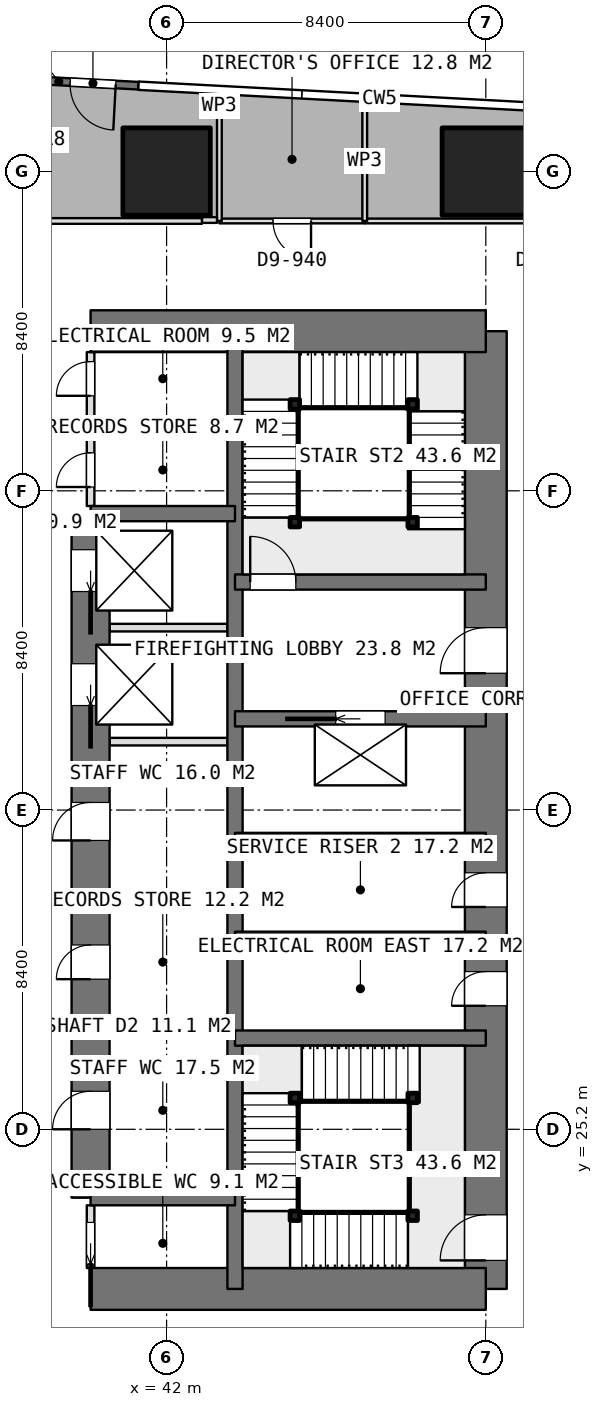
"""IFC4 building model, lengths in metres.
Left out: names, types, materials, properties, quantities, classifications, styles, units other than length and angle.
Written with IfcOpenShell. Run it as: python <this file> out.ifc"""

import sys

from ifc_helpers import new_model, si_unit, direction, frame, frame_2d, origin, origin_2d, place, context, subcontext, project, spatial, rectangle, extrude, element, fill, save


model = new_model("IFC4")
c1 = context("Model", 3, precision=1e-05, world=origin(), true_north=direction((0.0, 1.0)))
c2 = subcontext(c1, "Body", "Model", "MODEL_VIEW")
j1 = project(units=[si_unit("LENGTHUNIT", "METRE"), si_unit("PLANEANGLEUNIT", "RADIAN")], contexts=[c1])
p1 = place(None, origin())
s1 = spatial("IfcSite", under=j1, at=p1, CompositionType="ELEMENT")
p2 = place(p1, origin())
s2 = spatial("IfcBuilding", under=s1, at=p2, CompositionType="ELEMENT")
p3 = place(p2, frame((0.0, 0.0, 245.6)))
s3 = spatial("IfcBuildingStorey", under=s2, at=p3, CompositionType="ELEMENT", Elevation=245.6)
for number, where, z_axis, x_axis in (
    (1, (40.0, 21.0, 0.0), (0.0, 0.0, 1.0), (1.0, 0.0, 0.0)),
    (2, (40.0, 46.2, 0.0), (0.0, 0.0, 1.0), (1.0, 0.0, 0.0)),
):
    element("IfcWall", number, at=place(p3, frame(where, z_axis=z_axis, x_axis=x_axis)), inside=s3, PredefinedType="SHEAR", context=c2, shape_type="SweptSolid", body=[
        extrude(rectangle(XDim=10.4, YDim=1.1, at=frame_2d((5.2, 0.0))), origin(), (0.0, 0.0, 1.0), 4.5),
    ])
p4 = place(p3, frame((50.4, 21.0, 0.0), z_axis=(0.0, 0.0, 1.0), x_axis=(0.0, 1.0, 0.0)))
e3 = element("IfcWall", 3, at=p4, inside=s3, PredefinedType="SHEAR", context=c2, shape_type="SweptSolid", body=[
    extrude(rectangle(XDim=25.2, YDim=1.1, at=frame_2d((12.6, 0.0))), origin(), (0.0, 0.0, 1.0), 4.5),
])
p5 = place(p4, frame((16.2, 0.0, 0.0)))
e4 = element("IfcOpeningElement", 4, at=p5, cuts=e3, PredefinedType="OPENING", context=c2, shape_type="SweptSolid", body=[
    extrude(rectangle(XDim=1.2, YDim=2.1, at=frame_2d((0.6, 1.05))), frame((0.0, 0.56, 0.0), z_axis=(0.0, -1.0, 0.0), x_axis=(1.0, 0.0, 0.0)), (0.0, 0.0, 1.0), 1.12),
])
p6 = place(p4, frame((10.05, 0.0, 0.0)))
e5 = element("IfcOpeningElement", 5, at=p6, cuts=e3, PredefinedType="OPENING", context=c2, shape_type="SweptSolid", body=[
    extrude(rectangle(XDim=0.9, YDim=2.1, at=frame_2d((0.45, 1.05))), frame((0.0, 0.56, 0.0), z_axis=(0.0, -1.0, 0.0), x_axis=(1.0, 0.0, 0.0)), (0.0, 0.0, 1.0), 1.12),
])
p7 = place(p4, frame((7.45, 0.0, 0.0)))
e6 = element("IfcOpeningElement", 6, at=p7, cuts=e3, PredefinedType="OPENING", context=c2, shape_type="SweptSolid", body=[
    extrude(rectangle(XDim=0.9, YDim=2.1, at=frame_2d((0.45, 1.05))), frame((0.0, 0.56, 0.0), z_axis=(0.0, -1.0, 0.0), x_axis=(1.0, 0.0, 0.0)), (0.0, 0.0, 1.0), 1.12),
])
p8 = place(p4, frame((0.75, 0.0, 0.0)))
e7 = element("IfcOpeningElement", 7, at=p8, cuts=e3, PredefinedType="OPENING", context=c2, shape_type="SweptSolid", body=[
    extrude(rectangle(XDim=1.2, YDim=2.1, at=frame_2d((0.6, 1.05))), frame((0.0, 0.56, 0.0), z_axis=(0.0, -1.0, 0.0), x_axis=(1.0, 0.0, 0.0)), (0.0, 0.0, 1.0), 1.12),
])
p9 = place(p3, frame((43.8, 21.0, 0.0), z_axis=(0.0, 0.0, 1.0), x_axis=(0.0, 1.0, 0.0)))
e8 = element("IfcWall", 8, at=p9, inside=s3, PredefinedType="SHEAR", context=c2, shape_type="SweptSolid", body=[
    extrude(rectangle(XDim=25.2, YDim=0.4, at=frame_2d((12.6, 0.0))), origin(), (0.0, 0.0, 1.0), 4.5),
])
p10 = place(p3, frame((40.0, 23.4, 0.0), z_axis=(0.0, 0.0, 1.0), x_axis=(0.0, 1.0, 0.0)))
e9 = element("IfcWall", 9, at=p10, inside=s3, PredefinedType="SHEAR", context=c2, shape_type="SweptSolid", body=[
    extrude(rectangle(XDim=18.0, YDim=1.0, at=frame_2d((9.0, 0.0))), origin(), (0.0, 0.0, 1.0), 4.5),
])
p11 = place(p10, frame((1.8, 0.0, 0.0)))
e10 = element("IfcOpeningElement", 10, at=p11, cuts=e9, PredefinedType="OPENING", context=c2, shape_type="SweptSolid", body=[
    extrude(rectangle(XDim=1.0, YDim=2.1, at=frame_2d((0.5, 1.05))), frame((0.0, 0.51, 0.0), z_axis=(0.0, -1.0, 0.0), x_axis=(1.0, 0.0, 0.0)), (0.0, 0.0, 1.0), 1.02),
])
p12 = place(p10, frame((5.75, 0.0, 0.0)))
e11 = element("IfcOpeningElement", 11, at=p12, cuts=e9, PredefinedType="OPENING", context=c2, shape_type="SweptSolid", body=[
    extrude(rectangle(XDim=0.9, YDim=2.1, at=frame_2d((0.45, 1.05))), frame((0.0, 0.51, 0.0), z_axis=(0.0, -1.0, 0.0), x_axis=(1.0, 0.0, 0.0)), (0.0, 0.0, 1.0), 1.02),
])
p13 = place(p10, frame((9.4, 0.0, 0.0)))
e12 = element("IfcOpeningElement", 12, at=p13, cuts=e9, PredefinedType="OPENING", context=c2, shape_type="SweptSolid", body=[
    extrude(rectangle(XDim=1.0, YDim=2.1, at=frame_2d((0.5, 1.05))), frame((0.0, 0.51, 0.0), z_axis=(0.0, -1.0, 0.0), x_axis=(1.0, 0.0, 0.0)), (0.0, 0.0, 1.0), 1.02),
])
p14 = place(p10, frame((12.95, 0.0, 0.0)))
e13 = element("IfcOpeningElement", 13, at=p14, cuts=e9, PredefinedType="OPENING", context=c2, shape_type="SweptSolid", body=[
    extrude(rectangle(XDim=1.1, YDim=2.1, at=frame_2d((0.55, 1.05))), frame((0.0, 0.51, 0.0), z_axis=(0.0, -1.0, 0.0), x_axis=(1.0, 0.0, 0.0)), (0.0, 0.0, 1.0), 1.02),
])
p15 = place(p10, frame((15.95, 0.0, 0.0)))
e14 = element("IfcOpeningElement", 14, at=p15, cuts=e9, PredefinedType="OPENING", context=c2, shape_type="SweptSolid", body=[
    extrude(rectangle(XDim=1.1, YDim=2.1, at=frame_2d((0.55, 1.05))), frame((0.0, 0.51, 0.0), z_axis=(0.0, -1.0, 0.0), x_axis=(1.0, 0.0, 0.0)), (0.0, 0.0, 1.0), 1.02),
])
for number, where, z_axis, x_axis in (
    (15, (40.0, 23.4, 0.0), (0.0, 0.0, 1.0), (1.0, 0.0, 0.0)),
    (16, (40.0, 41.4, 0.0), (0.0, 0.0, 1.0), (1.0, 0.0, 0.0)),
):
    element("IfcWall", number, at=place(p3, frame(where, z_axis=z_axis, x_axis=x_axis)), inside=s3, PredefinedType="SHEAR", context=c2, shape_type="SweptSolid", body=[
        extrude(rectangle(XDim=3.8, YDim=0.4, at=frame_2d((1.9, 0.0))), origin(), (0.0, 0.0, 1.0), 4.5),
    ])
for number, where, z_axis, x_axis in (
    (17, (43.8, 27.6, 0.0), (0.0, 0.0, 1.0), (1.0, 0.0, 0.0)),
    (18, (43.8, 30.2, 0.0), (0.0, 0.0, 1.0), (1.0, 0.0, 0.0)),
    (19, (43.8, 32.8, 0.0), (0.0, 0.0, 1.0), (1.0, 0.0, 0.0)),
):
    element("IfcWall", number, at=place(p3, frame(where, z_axis=z_axis, x_axis=x_axis)), inside=s3, PredefinedType="SHEAR", context=c2, shape_type="SweptSolid", body=[
        extrude(rectangle(XDim=6.6, YDim=0.4, at=frame_2d((3.3, 0.0))), origin(), (0.0, 0.0, 1.0), 4.5),
    ])
p16 = place(p3, frame((43.8, 36.0, 0.0), z_axis=(0.0, 0.0, 1.0), x_axis=(1.0, 0.0, 0.0)))
e20 = element("IfcWall", 20, at=p16, inside=s3, PredefinedType="SHEAR", context=c2, shape_type="SweptSolid", body=[
    extrude(rectangle(XDim=6.6, YDim=0.4, at=frame_2d((3.3, 0.0))), origin(), (0.0, 0.0, 1.0), 4.5),
])
p17 = place(p16, frame((2.65, 0.0, 0.0)))
e21 = element("IfcOpeningElement", 21, at=p17, cuts=e20, PredefinedType="OPENING", context=c2, shape_type="SweptSolid", body=[
    extrude(rectangle(XDim=1.3, YDim=2.1, at=frame_2d((0.65, 1.05))), frame((0.0, 0.21, 0.0), z_axis=(0.0, -1.0, 0.0), x_axis=(1.0, 0.0, 0.0)), (0.0, 0.0, 1.0), 0.42),
])
p18 = place(p3, frame((43.8, 39.6, 0.0), z_axis=(0.0, 0.0, 1.0), x_axis=(1.0, 0.0, 0.0)))
e22 = element("IfcWall", 22, at=p18, inside=s3, PredefinedType="SHEAR", context=c2, shape_type="SweptSolid", body=[
    extrude(rectangle(XDim=6.6, YDim=0.4, at=frame_2d((3.3, 0.0))), origin(), (0.0, 0.0, 1.0), 4.5),
])
p19 = place(p18, frame((0.4, 0.0, 0.0)))
e23 = element("IfcOpeningElement", 23, at=p19, cuts=e22, PredefinedType="OPENING", context=c2, shape_type="SweptSolid", body=[
    extrude(rectangle(XDim=1.2, YDim=2.1, at=frame_2d((0.6, 1.05))), frame((0.0, 0.21, 0.0), z_axis=(0.0, -1.0, 0.0), x_axis=(1.0, 0.0, 0.0)), (0.0, 0.0, 1.0), 0.42),
])
for number, where, z_axis, x_axis in (
    (24, (42.0, 50.4, 0.0), (0.0, 0.0, 1.0), (1.0, 0.0, 0.0)),
    (25, (50.4, 50.4, 0.0), (0.0, 0.0, 1.0), (1.0, 0.0, 0.0)),
):
    element("IfcColumn", number, at=place(p3, frame(where, z_axis=z_axis, x_axis=x_axis)), inside=s3, PredefinedType="COLUMN", context=c2, shape_type="SweptSolid", body=[
        extrude(rectangle(XDim=2.3, YDim=2.3, at=origin_2d()), origin(), (0.0, 0.0, 1.0), 4.5),
    ])
p20 = place(p3, frame((41.26, 52.659, 0.0), z_axis=(0.0, 0.0, 1.0), x_axis=(-0.998590720997, 0.053071385312, 0.0)))
e26 = element("IfcWall", 26, at=p20, inside=s3, PredefinedType="SOLIDWALL", context=c2, shape_type="SweptSolid", body=[
    extrude(rectangle(XDim=4.2, YDim=0.2, at=frame_2d((2.1, 0.0))), origin(), (0.0, 0.0, 1.0), 4.25),
])
p21 = place(p20, frame((0.6, 0.0, 0.0)))
e27 = element("IfcOpeningElement", 27, at=p21, cuts=e26, PredefinedType="OPENING", context=c2, shape_type="SweptSolid", body=[
    extrude(rectangle(XDim=1.2, YDim=2.4, at=frame_2d((0.6, 1.2))), frame((0.0, 0.11, 0.0), z_axis=(0.0, -1.0, 0.0), x_axis=(1.0, 0.0, 0.0)), (0.0, 0.0, 1.0), 0.22),
])
p22 = place(p20, frame((2.4, 0.0, 0.0)))
e28 = element("IfcOpeningElement", 28, at=p22, cuts=e26, PredefinedType="OPENING", context=c2, shape_type="SweptSolid", body=[
    extrude(rectangle(XDim=1.2, YDim=2.4, at=frame_2d((0.6, 1.2))), frame((0.0, 0.11, 0.0), z_axis=(0.0, -1.0, 0.0), x_axis=(1.0, 0.0, 0.0)), (0.0, 0.0, 1.0), 0.22),
])
for number, where, z_axis, x_axis in (
    (29, (40.5, 35.4, 0.0), (0.0, 0.0, 1.0), (1.0, 0.0, 0.0)),
    (30, (40.5, 38.4, 0.0), (0.0, 0.0, 1.0), (1.0, 0.0, 0.0)),
):
    element("IfcWall", number, at=place(p3, frame(where, z_axis=z_axis, x_axis=x_axis)), inside=s3, PredefinedType="PARTITIONING", context=c2, shape_type="SweptSolid", body=[
        extrude(rectangle(XDim=3.1, YDim=0.2, at=frame_2d((1.55, 0.0))), origin(), (0.0, 0.0, 1.0), 4.25),
    ])
p23 = place(p3, frame((40.0, 21.55, 0.0), z_axis=(0.0, 0.0, 1.0), x_axis=(0.0, 1.0, 0.0)))
e31 = element("IfcWall", 31, at=p23, inside=s3, PredefinedType="PARTITIONING", context=c2, shape_type="SweptSolid", body=[
    extrude(rectangle(XDim=1.65, YDim=0.2, at=frame_2d((0.825, 0.0))), origin(), (0.0, 0.0, 1.0), 4.25),
])
p24 = place(p23, frame((0.1, 0.0, 0.0)))
e32 = element("IfcOpeningElement", 32, at=p24, cuts=e31, PredefinedType="OPENING", context=c2, shape_type="SweptSolid", body=[
    extrude(rectangle(XDim=1.1, YDim=2.1, at=frame_2d((0.55, 1.05))), frame((0.0, 0.11, 0.0), z_axis=(0.0, -1.0, 0.0), x_axis=(1.0, 0.0, 0.0)), (0.0, 0.0, 1.0), 0.22),
])
p25 = place(p3, frame((40.0, 41.6, 0.0), z_axis=(0.0, 0.0, 1.0), x_axis=(0.0, 1.0, 0.0)))
e33 = element("IfcWall", 33, at=p25, inside=s3, PredefinedType="PARTITIONING", context=c2, shape_type="SweptSolid", body=[
    extrude(rectangle(XDim=4.05, YDim=0.2, at=frame_2d((2.025, 0.0))), origin(), (0.0, 0.0, 1.0), 4.25),
])
p26 = place(p25, frame((2.9, 0.0, 0.0)))
e34 = element("IfcOpeningElement", 34, at=p26, cuts=e33, PredefinedType="OPENING", context=c2, shape_type="SweptSolid", body=[
    extrude(rectangle(XDim=0.9, YDim=2.1, at=frame_2d((0.45, 1.05))), frame((0.0, 0.11, 0.0), z_axis=(0.0, -1.0, 0.0), x_axis=(1.0, 0.0, 0.0)), (0.0, 0.0, 1.0), 0.22),
])
p27 = place(p25, frame((0.5, 0.0, 0.0)))
e35 = element("IfcOpeningElement", 35, at=p27, cuts=e33, PredefinedType="OPENING", context=c2, shape_type="SweptSolid", body=[
    extrude(rectangle(XDim=0.9, YDim=2.1, at=frame_2d((0.45, 1.05))), frame((0.0, 0.11, 0.0), z_axis=(0.0, -1.0, 0.0), x_axis=(1.0, 0.0, 0.0)), (0.0, 0.0, 1.0), 0.22),
])
for number, where, z_axis, x_axis in (
    (36, (40.5, 28.0, 0.0), (0.0, 0.0, 1.0), (1.0, 0.0, 0.0)),
    (37, (40.5, 31.2, 0.0), (0.0, 0.0, 1.0), (1.0, 0.0, 0.0)),
):
    element("IfcWall", number, at=place(p3, frame(where, z_axis=z_axis, x_axis=x_axis)), inside=s3, PredefinedType="PARTITIONING", context=c2, shape_type="SweptSolid", body=[
        extrude(rectangle(XDim=3.1, YDim=0.2, at=frame_2d((1.55, 0.0))), origin(), (0.0, 0.0, 1.0), 4.25),
    ])
p28 = place(p3, frame((40.0, 43.7, 0.0), z_axis=(0.0, 0.0, 1.0), x_axis=(1.0, 0.0, 0.0)))
e38 = element("IfcWall", 38, at=p28, inside=s3, PredefinedType="PARTITIONING", context=c2, shape_type="SweptSolid", body=[
    extrude(rectangle(XDim=3.6, YDim=0.2, at=frame_2d((1.8, 0.0))), origin(), (0.0, 0.0, 1.0), 4.25),
])
p29 = place(p3, frame((56.4, 49.1, 0.0), z_axis=(0.0, 0.0, 1.0), x_axis=(-1.0, 0.0, 0.0)))
e39 = element("IfcWall", 39, at=p29, inside=s3, PredefinedType="PARTITIONING", context=c2, shape_type="SweptSolid", body=[
    extrude(rectangle(XDim=9.186, YDim=0.125, at=frame_2d((4.593, 0.0))), origin(), (0.0, 0.0, 1.0), 4.25),
])
p30 = place(p29, frame((3.793, 0.0, 0.0)))
e40 = element("IfcOpeningElement", 40, at=p30, cuts=e39, PredefinedType="OPENING", context=c2, shape_type="SweptSolid", body=[
    extrude(rectangle(XDim=1.0, YDim=2.1, at=frame_2d((0.5, 1.05))), frame((0.0, 0.073, 0.0), z_axis=(0.0, -1.0, 0.0), x_axis=(1.0, 0.0, 0.0)), (0.0, 0.0, 1.0), 0.145),
])
p31 = place(p3, frame((47.214, 49.1, 0.0), z_axis=(0.0, 0.0, 1.0), x_axis=(0.0, 1.0, 0.0)))
e41 = element("IfcWall", 41, at=p31, inside=s3, PredefinedType="PARTITIONING", context=c2, shape_type="SweptSolid", body=[
    extrude(rectangle(XDim=3.163, YDim=0.125, at=frame_2d((1.582, 0.0))), origin(), (0.0, 0.0, 1.0), 4.25),
])
p32 = place(p3, frame((47.213, 49.1, 0.0), z_axis=(0.0, 0.0, 1.0), x_axis=(-1.0, 0.0, 0.0)))
e42 = element("IfcWall", 42, at=p32, inside=s3, PredefinedType="PARTITIONING", context=c2, shape_type="SweptSolid", body=[
    extrude(rectangle(XDim=3.824, YDim=0.125, at=frame_2d((1.912, 0.0))), origin(), (0.0, 0.0, 1.0), 4.25),
])
p33 = place(p32, frame((1.412, 0.0, 0.0)))
e43 = element("IfcOpeningElement", 43, at=p33, cuts=e42, PredefinedType="OPENING", context=c2, shape_type="SweptSolid", body=[
    extrude(rectangle(XDim=1.0, YDim=2.1, at=frame_2d((0.5, 1.05))), frame((0.0, 0.073, 0.0), z_axis=(0.0, -1.0, 0.0), x_axis=(1.0, 0.0, 0.0)), (0.0, 0.0, 1.0), 0.145),
])
p34 = place(p3, frame((43.389, 49.1, 0.0), z_axis=(0.0, 0.0, 1.0), x_axis=(0.0, 1.0, 0.0)))
e44 = element("IfcWall", 44, at=p34, inside=s3, PredefinedType="PARTITIONING", context=c2, shape_type="SweptSolid", body=[
    extrude(rectangle(XDim=3.366, YDim=0.125, at=frame_2d((1.683, 0.0))), origin(), (0.0, 0.0, 1.0), 4.25),
])
p35 = place(p3, frame((43.327, 49.125, 0.0), z_axis=(0.0, 0.0, 1.0), x_axis=(-1.0, 0.0, 0.0)))
e45 = element("IfcWall", 45, at=p35, inside=s3, PredefinedType="PARTITIONING", context=c2, shape_type="SweptSolid", body=[
    extrude(rectangle(XDim=0.397, YDim=0.15, at=frame_2d((0.198, 0.0))), origin(), (0.0, 0.0, 1.0), 4.25),
])
p36 = place(p3, frame((42.93, 49.1, 0.0), z_axis=(0.0, 0.0, 1.0), x_axis=(-1.0, 0.0, 0.0)))
e46 = element("IfcWall", 46, at=p36, inside=s3, PredefinedType="PARTITIONING", context=c2, shape_type="SweptSolid", body=[
    extrude(rectangle(XDim=20.534, YDim=0.15, at=frame_2d((10.267, 0.0))), origin(), (0.0, 0.0, 1.0), 4.25),
])
p37 = place(p36, frame((10.567, 0.0, 0.0)))
e47 = element("IfcOpeningElement", 47, at=p37, cuts=e46, PredefinedType="OPENING", context=c2, shape_type="SweptSolid", body=[
    extrude(rectangle(XDim=1.0, YDim=2.1, at=frame_2d((0.5, 1.05))), frame((0.0, 0.085, 0.0), z_axis=(0.0, -1.0, 0.0), x_axis=(1.0, 0.0, 0.0)), (0.0, 0.0, 1.0), 0.17),
])
for number, where, z_axis, x_axis in (
    (48, (45.375, 41.175, 0.0), (0.0, 0.0, 1.0), (1.0, 0.0, 0.0)),
    (49, (45.375, 44.275, 0.0), (0.0, 0.0, 1.0), (1.0, 0.0, 0.0)),
    (50, (48.475, 44.275, 0.0), (0.0, 0.0, 1.0), (1.0, 0.0, 0.0)),
    (51, (48.475, 41.175, 0.0), (0.0, 0.0, 1.0), (1.0, 0.0, 0.0)),
    (52, (48.475, 22.925, 0.0), (0.0, 0.0, 1.0), (1.0, 0.0, 0.0)),
    (53, (45.375, 22.925, 0.0), (0.0, 0.0, 1.0), (1.0, 0.0, 0.0)),
    (54, (45.375, 26.025, 0.0), (0.0, 0.0, 1.0), (1.0, 0.0, 0.0)),
    (55, (48.475, 26.025, 0.0), (0.0, 0.0, 1.0), (1.0, 0.0, 0.0)),
):
    element("IfcColumn", number, at=place(p3, frame(where, z_axis=z_axis, x_axis=x_axis)), inside=s3, PredefinedType="COLUMN", context=c2, shape_type="SweptSolid", body=[
        extrude(rectangle(XDim=0.25, YDim=0.25, at=origin_2d()), origin(), (0.0, 0.0, 1.0), 4.5),
    ])
p38 = place(p21, origin())
e56 = element("IfcDoor", 56, at=p38, inside=s3, OperationType="SINGLE_SWING_LEFT", PredefinedType="DOOR", context=c2, shape_type="SweptSolid", body=[
    extrude(rectangle(XDim=1.2, YDim=2.4, at=frame_2d((0.6, 1.2))), frame((0.0, 0.025, 0.0), z_axis=(0.0, -1.0, 0.0), x_axis=(1.0, 0.0, 0.0)), (0.0, 0.0, 1.0), 0.05),
])
fill(e27, e56)
p39 = place(p5, origin())
e57 = element("IfcDoor", 57, at=p39, inside=s3, OperationType="SINGLE_SWING_LEFT", PredefinedType="DOOR", context=c2, shape_type="SweptSolid", body=[
    extrude(rectangle(XDim=1.2, YDim=2.1, at=frame_2d((0.6, 1.05))), frame((0.0, 0.025, 0.0), z_axis=(0.0, -1.0, 0.0), x_axis=(1.0, 0.0, 0.0)), (0.0, 0.0, 1.0), 0.05),
])
fill(e4, e57)
p40 = place(p6, origin())
e58 = element("IfcDoor", 58, at=p40, inside=s3, OperationType="SINGLE_SWING_LEFT", PredefinedType="DOOR", context=c2, shape_type="SweptSolid", body=[
    extrude(rectangle(XDim=0.9, YDim=2.1, at=frame_2d((0.45, 1.05))), frame((0.0, 0.025, 0.0), z_axis=(0.0, -1.0, 0.0), x_axis=(1.0, 0.0, 0.0)), (0.0, 0.0, 1.0), 0.05),
])
fill(e5, e58)
p41 = place(p7, origin())
e59 = element("IfcDoor", 59, at=p41, inside=s3, OperationType="SINGLE_SWING_LEFT", PredefinedType="DOOR", context=c2, shape_type="SweptSolid", body=[
    extrude(rectangle(XDim=0.9, YDim=2.1, at=frame_2d((0.45, 1.05))), frame((0.0, 0.025, 0.0), z_axis=(0.0, -1.0, 0.0), x_axis=(1.0, 0.0, 0.0)), (0.0, 0.0, 1.0), 0.05),
])
fill(e6, e59)
p42 = place(p24, origin())
e60 = element("IfcDoor", 60, at=p42, inside=s3, OperationType="SLIDING_TO_LEFT", PredefinedType="DOOR", context=c2, shape_type="SweptSolid", body=[
    extrude(rectangle(XDim=1.1, YDim=2.1, at=frame_2d((0.55, 1.05))), frame((0.0, 0.025, 0.0), z_axis=(0.0, -1.0, 0.0), x_axis=(1.0, 0.0, 0.0)), (0.0, 0.0, 1.0), 0.05),
])
fill(e32, e60)
p43 = place(p26, origin())
e61 = element("IfcDoor", 61, at=p43, inside=s3, OperationType="SINGLE_SWING_LEFT", PredefinedType="DOOR", context=c2, shape_type="SweptSolid", body=[
    extrude(rectangle(XDim=0.9, YDim=2.1, at=frame_2d((0.45, 1.05))), frame((0.0, 0.025, 0.0), z_axis=(0.0, -1.0, 0.0), x_axis=(1.0, 0.0, 0.0)), (0.0, 0.0, 1.0), 0.05),
])
fill(e34, e61)
p44 = place(p27, origin())
e62 = element("IfcDoor", 62, at=p44, inside=s3, OperationType="SINGLE_SWING_LEFT", PredefinedType="DOOR", context=c2, shape_type="SweptSolid", body=[
    extrude(rectangle(XDim=0.9, YDim=2.1, at=frame_2d((0.45, 1.05))), frame((0.0, 0.025, 0.0), z_axis=(0.0, -1.0, 0.0), x_axis=(1.0, 0.0, 0.0)), (0.0, 0.0, 1.0), 0.05),
])
fill(e35, e62)
p45 = place(p11, origin())
e63 = element("IfcDoor", 63, at=p45, inside=s3, OperationType="SINGLE_SWING_LEFT", PredefinedType="DOOR", context=c2, shape_type="SweptSolid", body=[
    extrude(rectangle(XDim=1.0, YDim=2.1, at=frame_2d((0.5, 1.05))), frame((0.0, 0.025, 0.0), z_axis=(0.0, -1.0, 0.0), x_axis=(1.0, 0.0, 0.0)), (0.0, 0.0, 1.0), 0.05),
])
fill(e10, e63)
p46 = place(p12, origin())
e64 = element("IfcDoor", 64, at=p46, inside=s3, OperationType="SINGLE_SWING_LEFT", PredefinedType="DOOR", context=c2, shape_type="SweptSolid", body=[
    extrude(rectangle(XDim=0.9, YDim=2.1, at=frame_2d((0.45, 1.05))), frame((0.0, 0.025, 0.0), z_axis=(0.0, -1.0, 0.0), x_axis=(1.0, 0.0, 0.0)), (0.0, 0.0, 1.0), 0.05),
])
fill(e11, e64)
p47 = place(p13, origin())
e65 = element("IfcDoor", 65, at=p47, inside=s3, OperationType="SINGLE_SWING_LEFT", PredefinedType="DOOR", context=c2, shape_type="SweptSolid", body=[
    extrude(rectangle(XDim=1.0, YDim=2.1, at=frame_2d((0.5, 1.05))), frame((0.0, 0.025, 0.0), z_axis=(0.0, -1.0, 0.0), x_axis=(1.0, 0.0, 0.0)), (0.0, 0.0, 1.0), 0.05),
])
fill(e12, e65)
p48 = place(p17, origin())
e66 = element("IfcDoor", 66, at=p48, inside=s3, OperationType="SLIDING_TO_LEFT", PredefinedType="USERDEFINED", context=c2, shape_type="SweptSolid", body=[
    extrude(rectangle(XDim=1.3, YDim=2.1, at=frame_2d((0.65, 1.05))), frame((0.0, 0.025, 0.0), z_axis=(0.0, -1.0, 0.0), x_axis=(1.0, 0.0, 0.0)), (0.0, 0.0, 1.0), 0.05),
])
fill(e21, e66)
p49 = place(p14, origin())
e67 = element("IfcDoor", 67, at=p49, inside=s3, OperationType="SLIDING_TO_LEFT", PredefinedType="USERDEFINED", context=c2, shape_type="SweptSolid", body=[
    extrude(rectangle(XDim=1.1, YDim=2.1, at=frame_2d((0.55, 1.05))), frame((0.0, 0.025, 0.0), z_axis=(0.0, -1.0, 0.0), x_axis=(1.0, 0.0, 0.0)), (0.0, 0.0, 1.0), 0.05),
])
fill(e13, e67)
p50 = place(p15, origin())
e68 = element("IfcDoor", 68, at=p50, inside=s3, OperationType="SLIDING_TO_LEFT", PredefinedType="USERDEFINED", context=c2, shape_type="SweptSolid", body=[
    extrude(rectangle(XDim=1.1, YDim=2.1, at=frame_2d((0.55, 1.05))), frame((0.0, 0.025, 0.0), z_axis=(0.0, -1.0, 0.0), x_axis=(1.0, 0.0, 0.0)), (0.0, 0.0, 1.0), 0.05),
])
fill(e14, e68)
p51 = place(p33, origin())
e69 = element("IfcDoor", 69, at=p51, inside=s3, OperationType="SINGLE_SWING_LEFT", PredefinedType="DOOR", context=c2, shape_type="SweptSolid", body=[
    extrude(rectangle(XDim=1.0, YDim=2.1, at=frame_2d((0.5, 1.05))), frame((0.0, 0.025, 0.0), z_axis=(0.0, -1.0, 0.0), x_axis=(1.0, 0.0, 0.0)), (0.0, 0.0, 1.0), 0.05),
])
fill(e43, e69)
p52 = place(p19, origin())
e70 = element("IfcDoor", 70, at=p52, inside=s3, OperationType="SINGLE_SWING_RIGHT", PredefinedType="DOOR", context=c2, shape_type="SweptSolid", body=[
    extrude(rectangle(XDim=1.2, YDim=2.1, at=frame_2d((0.6, 1.05))), frame((0.0, 0.025, 0.0), z_axis=(0.0, -1.0, 0.0), x_axis=(1.0, 0.0, 0.0)), (0.0, 0.0, 1.0), 0.05),
])
fill(e23, e70)
p53 = place(p8, origin())
e71 = element("IfcDoor", 71, at=p53, inside=s3, OperationType="SINGLE_SWING_RIGHT", PredefinedType="DOOR", context=c2, shape_type="SweptSolid", body=[
    extrude(rectangle(XDim=1.2, YDim=2.1, at=frame_2d((0.6, 1.05))), frame((0.0, 0.025, 0.0), z_axis=(0.0, -1.0, 0.0), x_axis=(1.0, 0.0, 0.0)), (0.0, 0.0, 1.0), 0.05),
])
fill(e7, e71)
save(model, sys.argv[1])
